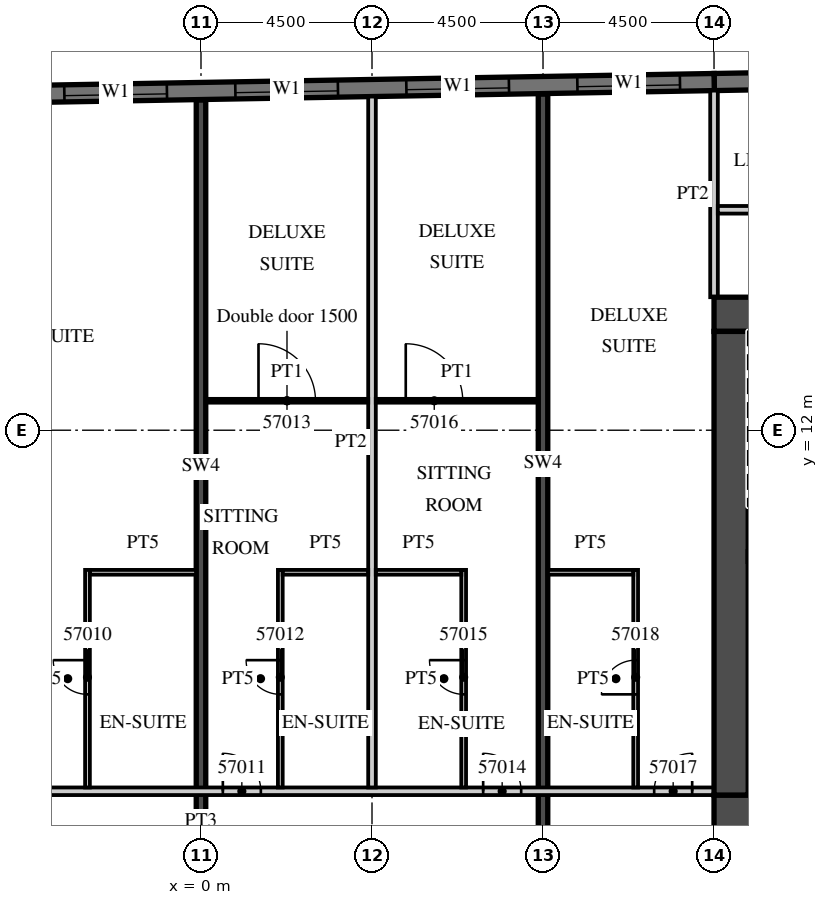
"""IFC4 building model, lengths in metres.
Left out: names, types, materials, properties, quantities, classifications, styles, units other than length and angle.
Written with IfcOpenShell. Run it as: python <this file> out.ifc"""

import sys

from ifc_helpers import new_model, si_unit, direction, frame, frame_2d, origin, place, context, subcontext, project, spatial, rectangle, extrude, element, fill, save


model = new_model("IFC4")
c1 = context("Model", 3, precision=1e-05, world=origin(), true_north=direction((0.0, 1.0)))
c2 = subcontext(c1, "Body", "Model", "MODEL_VIEW")
j1 = project(units=[si_unit("LENGTHUNIT", "METRE"), si_unit("PLANEANGLEUNIT", "RADIAN")], contexts=[c1])
p1 = place(None, origin())
s1 = spatial("IfcSite", under=j1, at=p1, CompositionType="ELEMENT")
p2 = place(p1, origin())
s2 = spatial("IfcBuilding", under=s1, at=p2, CompositionType="ELEMENT")
p3 = place(p2, frame((0.0, 0.0, 234.2)))
s3 = spatial("IfcBuildingStorey", under=s2, at=p3, CompositionType="ELEMENT", Elevation=234.2)
p4 = place(p3, frame((0.0, 1.4, 0.0), z_axis=(0.0, 0.0, 1.0), x_axis=(0.0, 1.0, 0.0)))
e1 = element("IfcWall", 1, at=p4, inside=s3, PredefinedType="SHEAR", context=c2, shape_type="SweptSolid", body=[
    extrude(rectangle(XDim=19.289, YDim=0.25, at=frame_2d((9.644, 0.0))), origin(), (0.0, 0.0, 1.0), 3.3),
])
p5 = place(p3, frame((9.0, 1.4, 0.0), z_axis=(0.0, 0.0, 1.0), x_axis=(0.0, 1.0, 0.0)))
e2 = element("IfcWall", 2, at=p5, inside=s3, PredefinedType="SHEAR", context=c2, shape_type="SweptSolid", body=[
    extrude(rectangle(XDim=19.446, YDim=0.25, at=frame_2d((9.723, 0.0))), origin(), (0.0, 0.0, 1.0), 3.3),
])
p6 = place(p3, frame((31.504, 21.476, 0.0), z_axis=(0.0, 0.0, 1.0), x_axis=(-0.999847677887, -0.017453395744, 0.0)))
e3 = element("IfcWall", 3, at=p6, inside=s3, PredefinedType="SOLIDWALL", context=c2, shape_type="SweptSolid", body=[
    extrude(rectangle(XDim=18.003, YDim=0.45, at=frame_2d((9.001, 0.0))), origin(), (0.0, 0.0, 1.0), 3.02),
])
p7 = place(p3, frame((13.504, 21.161, 0.0), z_axis=(0.0, 0.0, 1.0), x_axis=(-0.999847763257, -0.017448504532, 0.0)))
e4 = element("IfcWall", 4, at=p7, inside=s3, PredefinedType="SOLIDWALL", context=c2, shape_type="SweptSolid", body=[
    extrude(rectangle(XDim=46.859, YDim=0.45, at=frame_2d((23.43, 0.0))), origin(), (0.0, 0.0, 1.0), 3.02),
])
p8 = place(p7, frame((0.9, 0.0, 0.45)))
e5 = element("IfcOpeningElement", 5, at=p8, cuts=e4, PredefinedType="OPENING", context=c2, shape_type="SweptSolid", body=[
    extrude(rectangle(XDim=2.7, YDim=2.25, at=frame_2d((1.35, 1.125))), frame((0.0, 0.235, 0.0), z_axis=(0.0, -1.0, 0.0), x_axis=(1.0, 0.0, 0.0)), (0.0, 0.0, 1.0), 0.47),
])
p9 = place(p7, frame((5.401, 0.0, 0.45)))
e6 = element("IfcOpeningElement", 6, at=p9, cuts=e4, PredefinedType="OPENING", context=c2, shape_type="SweptSolid", body=[
    extrude(rectangle(XDim=2.7, YDim=2.25, at=frame_2d((1.35, 1.125))), frame((0.0, 0.235, 0.0), z_axis=(0.0, -1.0, 0.0), x_axis=(1.0, 0.0, 0.0)), (0.0, 0.0, 1.0), 0.47),
])
p10 = place(p7, frame((9.902, 0.0, 0.45)))
e7 = element("IfcOpeningElement", 7, at=p10, cuts=e4, PredefinedType="OPENING", context=c2, shape_type="SweptSolid", body=[
    extrude(rectangle(XDim=2.7, YDim=2.25, at=frame_2d((1.35, 1.125))), frame((0.0, 0.235, 0.0), z_axis=(0.0, -1.0, 0.0), x_axis=(1.0, 0.0, 0.0)), (0.0, 0.0, 1.0), 0.47),
])
p11 = place(p7, frame((14.402, 0.0, 0.45)))
e8 = element("IfcOpeningElement", 8, at=p11, cuts=e4, PredefinedType="OPENING", context=c2, shape_type="SweptSolid", body=[
    extrude(rectangle(XDim=2.7, YDim=2.25, at=frame_2d((1.35, 1.125))), frame((0.0, 0.235, 0.0), z_axis=(0.0, -1.0, 0.0), x_axis=(1.0, 0.0, 0.0)), (0.0, 0.0, 1.0), 0.47),
])
p12 = place(p7, frame((18.903, 0.0, 0.45)))
e9 = element("IfcOpeningElement", 9, at=p12, cuts=e4, PredefinedType="OPENING", context=c2, shape_type="SweptSolid", body=[
    extrude(rectangle(XDim=2.7, YDim=2.25, at=frame_2d((1.35, 1.125))), frame((0.0, 0.235, 0.0), z_axis=(0.0, -1.0, 0.0), x_axis=(1.0, 0.0, 0.0)), (0.0, 0.0, 1.0), 0.47),
])
p13 = place(p7, frame((23.404, 0.0, 0.45)))
e10 = element("IfcOpeningElement", 10, at=p13, cuts=e4, PredefinedType="OPENING", context=c2, shape_type="SweptSolid", body=[
    extrude(rectangle(XDim=2.7, YDim=2.25, at=frame_2d((1.35, 1.125))), frame((0.0, 0.235, 0.0), z_axis=(0.0, -1.0, 0.0), x_axis=(1.0, 0.0, 0.0)), (0.0, 0.0, 1.0), 0.47),
])
p14 = place(p7, frame((27.904, 0.0, 0.45)))
e11 = element("IfcOpeningElement", 11, at=p14, cuts=e4, PredefinedType="OPENING", context=c2, shape_type="SweptSolid", body=[
    extrude(rectangle(XDim=2.7, YDim=2.25, at=frame_2d((1.35, 1.125))), frame((0.0, 0.235, 0.0), z_axis=(0.0, -1.0, 0.0), x_axis=(1.0, 0.0, 0.0)), (0.0, 0.0, 1.0), 0.47),
])
p15 = place(p7, frame((32.405, 0.0, 0.45)))
e12 = element("IfcOpeningElement", 12, at=p15, cuts=e4, PredefinedType="OPENING", context=c2, shape_type="SweptSolid", body=[
    extrude(rectangle(XDim=2.7, YDim=2.25, at=frame_2d((1.35, 1.125))), frame((0.0, 0.235, 0.0), z_axis=(0.0, -1.0, 0.0), x_axis=(1.0, 0.0, 0.0)), (0.0, 0.0, 1.0), 0.47),
])
p16 = place(p7, frame((36.906, 0.0, 0.45)))
e13 = element("IfcOpeningElement", 13, at=p16, cuts=e4, PredefinedType="OPENING", context=c2, shape_type="SweptSolid", body=[
    extrude(rectangle(XDim=2.7, YDim=2.25, at=frame_2d((1.35, 1.125))), frame((0.0, 0.235, 0.0), z_axis=(0.0, -1.0, 0.0), x_axis=(1.0, 0.0, 0.0)), (0.0, 0.0, 1.0), 0.47),
])
p17 = place(p7, frame((41.406, 0.0, 0.45)))
e14 = element("IfcOpeningElement", 14, at=p17, cuts=e4, PredefinedType="OPENING", context=c2, shape_type="SweptSolid", body=[
    extrude(rectangle(XDim=2.7, YDim=2.25, at=frame_2d((1.35, 1.125))), frame((0.0, 0.235, 0.0), z_axis=(0.0, -1.0, 0.0), x_axis=(1.0, 0.0, 0.0)), (0.0, 0.0, 1.0), 0.47),
])
p18 = place(p3, frame((13.5, 15.5, 0.0), z_axis=(0.0, 0.0, 1.0), x_axis=(0.0, 1.0, 0.0)))
e15 = element("IfcWall", 15, at=p18, inside=s3, PredefinedType="PARTITIONING", context=c2, shape_type="SweptSolid", body=[
    extrude(rectangle(XDim=5.436, YDim=0.2, at=frame_2d((2.718, 0.0))), origin(), (0.0, 0.0, 1.0), 3.02),
])
p19 = place(p3, frame((-13.5, 2.5, 0.0), z_axis=(0.0, 0.0, 1.0), x_axis=(1.0, 0.0, 0.0)))
e16 = element("IfcWall", 16, at=p19, inside=s3, PredefinedType="PARTITIONING", context=c2, shape_type="SweptSolid", body=[
    extrude(rectangle(XDim=27.0, YDim=0.2, at=frame_2d((13.5, 0.0))), origin(), (0.0, 0.0, 1.0), 3.02),
])
p20 = place(p19, frame((2.925, 0.0, 0.0)))
e17 = element("IfcOpeningElement", 17, at=p20, cuts=e16, PredefinedType="OPENING", context=c2, shape_type="SweptSolid", body=[
    extrude(rectangle(XDim=1.0, YDim=2.1, at=frame_2d((0.5, 1.05))), frame((0.0, 0.11, 0.0), z_axis=(0.0, -1.0, 0.0), x_axis=(1.0, 0.0, 0.0)), (0.0, 0.0, 1.0), 0.22),
])
p21 = place(p19, frame((6.938, 0.0, 0.0)))
e18 = element("IfcOpeningElement", 18, at=p21, cuts=e16, PredefinedType="OPENING", context=c2, shape_type="SweptSolid", body=[
    extrude(rectangle(XDim=1.2, YDim=2.1, at=frame_2d((0.6, 1.05))), frame((0.0, 0.11, 0.0), z_axis=(0.0, -1.0, 0.0), x_axis=(1.0, 0.0, 0.0)), (0.0, 0.0, 1.0), 0.22),
])
p22 = place(p19, frame((14.075, 0.0, 0.0)))
e19 = element("IfcOpeningElement", 19, at=p22, cuts=e16, PredefinedType="OPENING", context=c2, shape_type="SweptSolid", body=[
    extrude(rectangle(XDim=1.0, YDim=2.1, at=frame_2d((0.5, 1.05))), frame((0.0, 0.11, 0.0), z_axis=(0.0, -1.0, 0.0), x_axis=(1.0, 0.0, 0.0)), (0.0, 0.0, 1.0), 0.22),
])
p23 = place(p19, frame((20.925, 0.0, 0.0)))
e20 = element("IfcOpeningElement", 20, at=p23, cuts=e16, PredefinedType="OPENING", context=c2, shape_type="SweptSolid", body=[
    extrude(rectangle(XDim=1.0, YDim=2.1, at=frame_2d((0.5, 1.05))), frame((0.0, 0.11, 0.0), z_axis=(0.0, -1.0, 0.0), x_axis=(1.0, 0.0, 0.0)), (0.0, 0.0, 1.0), 0.22),
])
p24 = place(p19, frame((25.425, 0.0, 0.0)))
e21 = element("IfcOpeningElement", 21, at=p24, cuts=e16, PredefinedType="OPENING", context=c2, shape_type="SweptSolid", body=[
    extrude(rectangle(XDim=1.0, YDim=2.1, at=frame_2d((0.5, 1.05))), frame((0.0, 0.11, 0.0), z_axis=(0.0, -1.0, 0.0), x_axis=(1.0, 0.0, 0.0)), (0.0, 0.0, 1.0), 0.22),
])
p25 = place(p3, frame((-2.987, 2.6, 0.0), z_axis=(0.0, 0.0, 1.0), x_axis=(0.0, 1.0, 0.0)))
e22 = element("IfcWall", 22, at=p25, inside=s3, PredefinedType="PARTITIONING", context=c2, shape_type="SweptSolid", body=[
    extrude(rectangle(XDim=5.725, YDim=0.125, at=frame_2d((2.862, 0.0))), origin(), (0.0, 0.0, 1.0), 3.02),
])
p26 = place(p25, frame((2.45, 0.0, 0.0)))
e23 = element("IfcOpeningElement", 23, at=p26, cuts=e22, PredefinedType="OPENING", context=c2, shape_type="SweptSolid", body=[
    extrude(rectangle(XDim=0.9, YDim=2.1, at=frame_2d((0.45, 1.05))), frame((0.0, 0.073, 0.0), z_axis=(0.0, -1.0, 0.0), x_axis=(1.0, 0.0, 0.0)), (0.0, 0.0, 1.0), 0.145),
])
p27 = place(p3, frame((-2.925, 8.262, 0.0), z_axis=(0.0, 0.0, 1.0), x_axis=(1.0, 0.0, 0.0)))
e24 = element("IfcWall", 24, at=p27, inside=s3, PredefinedType="PARTITIONING", context=c2, shape_type="SweptSolid", body=[
    extrude(rectangle(XDim=2.8, YDim=0.125, at=frame_2d((1.4, 0.0))), origin(), (0.0, 0.0, 1.0), 3.02),
])
p28 = place(p3, frame((4.5, 2.6, 0.0), z_axis=(0.0, 0.0, 1.0), x_axis=(0.0, 1.0, 0.0)))
e25 = element("IfcWall", 25, at=p28, inside=s3, PredefinedType="PARTITIONING", context=c2, shape_type="SweptSolid", body=[
    extrude(rectangle(XDim=18.179, YDim=0.2, at=frame_2d((9.089, 0.0))), origin(), (0.0, 0.0, 1.0), 3.02),
])
p29 = place(p3, frame((2.087, 2.6, 0.0), z_axis=(0.0, 0.0, 1.0), x_axis=(0.0, 1.0, 0.0)))
e26 = element("IfcWall", 26, at=p29, inside=s3, PredefinedType="PARTITIONING", context=c2, shape_type="SweptSolid", body=[
    extrude(rectangle(XDim=5.725, YDim=0.125, at=frame_2d((2.862, 0.0))), origin(), (0.0, 0.0, 1.0), 3.02),
])
p30 = place(p29, frame((2.45, 0.0, 0.0)))
e27 = element("IfcOpeningElement", 27, at=p30, cuts=e26, PredefinedType="OPENING", context=c2, shape_type="SweptSolid", body=[
    extrude(rectangle(XDim=0.9, YDim=2.1, at=frame_2d((0.45, 1.05))), frame((0.0, 0.073, 0.0), z_axis=(0.0, -1.0, 0.0), x_axis=(1.0, 0.0, 0.0)), (0.0, 0.0, 1.0), 0.145),
])
p31 = place(p3, frame((2.15, 8.262, 0.0), z_axis=(0.0, 0.0, 1.0), x_axis=(1.0, 0.0, 0.0)))
e28 = element("IfcWall", 28, at=p31, inside=s3, PredefinedType="PARTITIONING", context=c2, shape_type="SweptSolid", body=[
    extrude(rectangle(XDim=2.25, YDim=0.125, at=frame_2d((1.125, 0.0))), origin(), (0.0, 0.0, 1.0), 3.02),
])
p32 = place(p3, frame((0.125, 12.775, 0.0), z_axis=(0.0, 0.0, 1.0), x_axis=(1.0, 0.0, 0.0)))
e29 = element("IfcWall", 29, at=p32, inside=s3, PredefinedType="PARTITIONING", context=c2, shape_type="SweptSolid", body=[
    extrude(rectangle(XDim=4.275, YDim=0.1, at=frame_2d((2.137, 0.0))), origin(), (0.0, 0.0, 1.0), 3.02),
])
p33 = place(p32, frame((1.388, 0.0, 0.0)))
e30 = element("IfcOpeningElement", 30, at=p33, cuts=e29, PredefinedType="OPENING", context=c2, shape_type="SweptSolid", body=[
    extrude(rectangle(XDim=1.5, YDim=2.1, at=frame_2d((0.75, 1.05))), frame((0.0, 0.06, 0.0), z_axis=(0.0, -1.0, 0.0), x_axis=(1.0, 0.0, 0.0)), (0.0, 0.0, 1.0), 0.12),
])
p34 = place(p3, frame((6.912, 2.6, 0.0), z_axis=(0.0, 0.0, 1.0), x_axis=(0.0, 1.0, 0.0)))
e31 = element("IfcWall", 31, at=p34, inside=s3, PredefinedType="PARTITIONING", context=c2, shape_type="SweptSolid", body=[
    extrude(rectangle(XDim=5.725, YDim=0.125, at=frame_2d((2.862, 0.0))), origin(), (0.0, 0.0, 1.0), 3.02),
])
p35 = place(p34, frame((2.45, 0.0, 0.0)))
e32 = element("IfcOpeningElement", 32, at=p35, cuts=e31, PredefinedType="OPENING", context=c2, shape_type="SweptSolid", body=[
    extrude(rectangle(XDim=0.9, YDim=2.1, at=frame_2d((0.45, 1.05))), frame((0.0, 0.073, 0.0), z_axis=(0.0, -1.0, 0.0), x_axis=(1.0, 0.0, 0.0)), (0.0, 0.0, 1.0), 0.145),
])
p36 = place(p3, frame((4.6, 8.262, 0.0), z_axis=(0.0, 0.0, 1.0), x_axis=(1.0, 0.0, 0.0)))
e33 = element("IfcWall", 33, at=p36, inside=s3, PredefinedType="PARTITIONING", context=c2, shape_type="SweptSolid", body=[
    extrude(rectangle(XDim=2.25, YDim=0.125, at=frame_2d((1.125, 0.0))), origin(), (0.0, 0.0, 1.0), 3.02),
])
p37 = place(p3, frame((4.6, 12.775, 0.0), z_axis=(0.0, 0.0, 1.0), x_axis=(1.0, 0.0, 0.0)))
e34 = element("IfcWall", 34, at=p37, inside=s3, PredefinedType="PARTITIONING", context=c2, shape_type="SweptSolid", body=[
    extrude(rectangle(XDim=4.275, YDim=0.1, at=frame_2d((2.137, 0.0))), origin(), (0.0, 0.0, 1.0), 3.02),
])
p38 = place(p37, frame((0.788, 0.0, 0.0)))
e35 = element("IfcOpeningElement", 35, at=p38, cuts=e34, PredefinedType="OPENING", context=c2, shape_type="SweptSolid", body=[
    extrude(rectangle(XDim=1.5, YDim=2.1, at=frame_2d((0.75, 1.05))), frame((0.0, 0.06, 0.0), z_axis=(0.0, -1.0, 0.0), x_axis=(1.0, 0.0, 0.0)), (0.0, 0.0, 1.0), 0.12),
])
p39 = place(p3, frame((11.438, 2.6, 0.0), z_axis=(0.0, 0.0, 1.0), x_axis=(0.0, 1.0, 0.0)))
e36 = element("IfcWall", 36, at=p39, inside=s3, PredefinedType="PARTITIONING", context=c2, shape_type="SweptSolid", body=[
    extrude(rectangle(XDim=5.725, YDim=0.125, at=frame_2d((2.862, 0.0))), origin(), (0.0, 0.0, 1.0), 3.02),
])
p40 = place(p39, frame((2.45, 0.0, 0.0)))
e37 = element("IfcOpeningElement", 37, at=p40, cuts=e36, PredefinedType="OPENING", context=c2, shape_type="SweptSolid", body=[
    extrude(rectangle(XDim=0.9, YDim=2.1, at=frame_2d((0.45, 1.05))), frame((0.0, 0.073, 0.0), z_axis=(0.0, -1.0, 0.0), x_axis=(1.0, 0.0, 0.0)), (0.0, 0.0, 1.0), 0.145),
])
p41 = place(p3, frame((9.125, 8.262, 0.0), z_axis=(0.0, 0.0, 1.0), x_axis=(1.0, 0.0, 0.0)))
e38 = element("IfcWall", 38, at=p41, inside=s3, PredefinedType="PARTITIONING", context=c2, shape_type="SweptSolid", body=[
    extrude(rectangle(XDim=2.25, YDim=0.125, at=frame_2d((1.125, 0.0))), origin(), (0.0, 0.0, 1.0), 3.02),
])
p42 = place(p3, frame((13.5, 1.95, 0.0), z_axis=(0.0, 0.0, 1.0), x_axis=(1.0, 0.0, 0.0)))
e39 = element("IfcWall", 39, at=p42, inside=s3, PredefinedType="SHEAR", context=c2, shape_type="SweptSolid", body=[
    extrude(rectangle(XDim=18.0, YDim=0.9, at=frame_2d((9.0, 0.0))), origin(), (0.0, 0.0, 1.0), 3.02),
])
p43 = place(p42, frame((1.475, 0.0, 0.0)))
e40 = element("IfcOpeningElement", 40, at=p43, cuts=e39, PredefinedType="OPENING", context=c2, shape_type="SweptSolid", body=[
    extrude(rectangle(XDim=1.8, YDim=2.1, at=frame_2d((0.9, 1.05))), frame((0.0, 0.46, 0.0), z_axis=(0.0, -1.0, 0.0), x_axis=(1.0, 0.0, 0.0)), (0.0, 0.0, 1.0), 0.92),
])
p44 = place(p3, frame((13.5, 15.05, 0.0), z_axis=(0.0, 0.0, 1.0), x_axis=(1.0, 0.0, 0.0)))
e41 = element("IfcWall", 41, at=p44, inside=s3, PredefinedType="SHEAR", context=c2, shape_type="SweptSolid", body=[
    extrude(rectangle(XDim=6.8, YDim=0.9, at=frame_2d((3.4, 0.0))), origin(), (0.0, 0.0, 1.0), 3.02),
])
p45 = place(p44, frame((4.725, 0.0, 0.0)))
e42 = element("IfcOpeningElement", 42, at=p45, cuts=e41, PredefinedType="OPENING", context=c2, shape_type="SweptSolid", body=[
    extrude(rectangle(XDim=1.2, YDim=2.1, at=frame_2d((0.6, 1.05))), frame((0.0, 0.46, 0.0), z_axis=(0.0, -1.0, 0.0), x_axis=(1.0, 0.0, 0.0)), (0.0, 0.0, 1.0), 0.92),
])
p46 = place(p3, frame((13.95, 2.4, 0.0), z_axis=(0.0, 0.0, 1.0), x_axis=(0.0, 1.0, 0.0)))
e43 = element("IfcWall", 43, at=p46, inside=s3, PredefinedType="SHEAR", context=c2, shape_type="SweptSolid", body=[
    extrude(rectangle(XDim=12.2, YDim=0.9, at=frame_2d((6.1, 0.0))), origin(), (0.0, 0.0, 1.0), 3.02),
])
p47 = place(p3, frame((13.6, 17.8, 0.0), z_axis=(0.0, 0.0, 1.0), x_axis=(1.0, 0.0, 0.0)))
e44 = element("IfcWall", 44, at=p47, inside=s3, PredefinedType="PARTITIONING", context=c2, shape_type="SweptSolid", body=[
    extrude(rectangle(XDim=28.657, YDim=0.2, at=frame_2d((14.329, 0.0))), origin(), (0.0, 0.0, 1.0), 3.02),
])
p48 = place(p47, frame((16.613, 0.0, 0.0)))
e45 = element("IfcOpeningElement", 45, at=p48, cuts=e44, PredefinedType="OPENING", context=c2, shape_type="SweptSolid", body=[
    extrude(rectangle(XDim=0.9, YDim=2.1, at=frame_2d((0.45, 1.05))), frame((0.0, 0.11, 0.0), z_axis=(0.0, -1.0, 0.0), x_axis=(1.0, 0.0, 0.0)), (0.0, 0.0, 1.0), 0.22),
])
p49 = place(p47, frame((8.312, 0.0, 0.0)))
e46 = element("IfcOpeningElement", 46, at=p49, cuts=e44, PredefinedType="OPENING", context=c2, shape_type="SweptSolid", body=[
    extrude(rectangle(XDim=0.9, YDim=2.1, at=frame_2d((0.45, 1.05))), frame((0.0, 0.11, 0.0), z_axis=(0.0, -1.0, 0.0), x_axis=(1.0, 0.0, 0.0)), (0.0, 0.0, 1.0), 0.22),
])
p50 = place(p8, origin())
e47 = element("IfcWindow", 47, at=p50, inside=s3, PartitioningType="SINGLE_PANEL", PredefinedType="WINDOW", context=c2, shape_type="SweptSolid", body=[
    extrude(rectangle(XDim=2.7, YDim=2.25, at=frame_2d((1.35, 1.125))), frame((0.0, 0.09, 0.0), z_axis=(0.0, -1.0, 0.0), x_axis=(1.0, 0.0, 0.0)), (0.0, 0.0, 1.0), 0.06),
])
fill(e5, e47)
p51 = place(p9, origin())
e48 = element("IfcWindow", 48, at=p51, inside=s3, PartitioningType="SINGLE_PANEL", PredefinedType="WINDOW", context=c2, shape_type="SweptSolid", body=[
    extrude(rectangle(XDim=2.7, YDim=2.25, at=frame_2d((1.35, 1.125))), frame((0.0, 0.09, 0.0), z_axis=(0.0, -1.0, 0.0), x_axis=(1.0, 0.0, 0.0)), (0.0, 0.0, 1.0), 0.06),
])
fill(e6, e48)
p52 = place(p10, origin())
e49 = element("IfcWindow", 49, at=p52, inside=s3, PartitioningType="SINGLE_PANEL", PredefinedType="WINDOW", context=c2, shape_type="SweptSolid", body=[
    extrude(rectangle(XDim=2.7, YDim=2.25, at=frame_2d((1.35, 1.125))), frame((0.0, 0.09, 0.0), z_axis=(0.0, -1.0, 0.0), x_axis=(1.0, 0.0, 0.0)), (0.0, 0.0, 1.0), 0.06),
])
fill(e7, e49)
p53 = place(p11, origin())
e50 = element("IfcWindow", 50, at=p53, inside=s3, PartitioningType="SINGLE_PANEL", PredefinedType="WINDOW", context=c2, shape_type="SweptSolid", body=[
    extrude(rectangle(XDim=2.7, YDim=2.25, at=frame_2d((1.35, 1.125))), frame((0.0, 0.09, 0.0), z_axis=(0.0, -1.0, 0.0), x_axis=(1.0, 0.0, 0.0)), (0.0, 0.0, 1.0), 0.06),
])
fill(e8, e50)
p54 = place(p26, origin())
e51 = element("IfcDoor", 51, at=p54, inside=s3, OperationType="SINGLE_SWING_RIGHT", PredefinedType="DOOR", context=c2, shape_type="SweptSolid", body=[
    extrude(rectangle(XDim=0.9, YDim=2.1, at=frame_2d((0.45, 1.05))), frame((0.0, 0.025, 0.0), z_axis=(0.0, -1.0, 0.0), x_axis=(1.0, 0.0, 0.0)), (0.0, 0.0, 1.0), 0.05),
])
fill(e23, e51)
p55 = place(p22, origin())
e52 = element("IfcDoor", 52, at=p55, inside=s3, OperationType="SINGLE_SWING_LEFT", PredefinedType="DOOR", context=c2, shape_type="SweptSolid", body=[
    extrude(rectangle(XDim=1.0, YDim=2.1, at=frame_2d((0.5, 1.05))), frame((0.0, 0.025, 0.0), z_axis=(0.0, -1.0, 0.0), x_axis=(1.0, 0.0, 0.0)), (0.0, 0.0, 1.0), 0.05),
])
fill(e19, e52)
p56 = place(p30, origin())
e53 = element("IfcDoor", 53, at=p56, inside=s3, OperationType="SINGLE_SWING_RIGHT", PredefinedType="DOOR", context=c2, shape_type="SweptSolid", body=[
    extrude(rectangle(XDim=0.9, YDim=2.1, at=frame_2d((0.45, 1.05))), frame((0.0, 0.025, 0.0), z_axis=(0.0, -1.0, 0.0), x_axis=(1.0, 0.0, 0.0)), (0.0, 0.0, 1.0), 0.05),
])
fill(e27, e53)
p57 = place(p33, origin())
e54 = element("IfcDoor", 54, at=p57, inside=s3, OperationType="SINGLE_SWING_LEFT", PredefinedType="DOOR", context=c2, shape_type="SweptSolid", body=[
    extrude(rectangle(XDim=1.5, YDim=2.1, at=frame_2d((0.75, 1.05))), frame((0.0, 0.025, 0.0), z_axis=(0.0, -1.0, 0.0), x_axis=(1.0, 0.0, 0.0)), (0.0, 0.0, 1.0), 0.05),
])
fill(e30, e54)
p58 = place(p23, origin())
e55 = element("IfcDoor", 55, at=p58, inside=s3, OperationType="SINGLE_SWING_LEFT", PredefinedType="DOOR", context=c2, shape_type="SweptSolid", body=[
    extrude(rectangle(XDim=1.0, YDim=2.1, at=frame_2d((0.5, 1.05))), frame((0.0, 0.025, 0.0), z_axis=(0.0, -1.0, 0.0), x_axis=(1.0, 0.0, 0.0)), (0.0, 0.0, 1.0), 0.05),
])
fill(e20, e55)
p59 = place(p35, origin())
e56 = element("IfcDoor", 56, at=p59, inside=s3, OperationType="SINGLE_SWING_RIGHT", PredefinedType="DOOR", context=c2, shape_type="SweptSolid", body=[
    extrude(rectangle(XDim=0.9, YDim=2.1, at=frame_2d((0.45, 1.05))), frame((0.0, 0.025, 0.0), z_axis=(0.0, -1.0, 0.0), x_axis=(1.0, 0.0, 0.0)), (0.0, 0.0, 1.0), 0.05),
])
fill(e32, e56)
p60 = place(p38, origin())
e57 = element("IfcDoor", 57, at=p60, inside=s3, OperationType="SINGLE_SWING_LEFT", PredefinedType="DOOR", context=c2, shape_type="SweptSolid", body=[
    extrude(rectangle(XDim=1.5, YDim=2.1, at=frame_2d((0.75, 1.05))), frame((0.0, 0.025, 0.0), z_axis=(0.0, -1.0, 0.0), x_axis=(1.0, 0.0, 0.0)), (0.0, 0.0, 1.0), 0.05),
])
fill(e35, e57)
p61 = place(p24, origin())
e58 = element("IfcDoor", 58, at=p61, inside=s3, OperationType="SINGLE_SWING_RIGHT", PredefinedType="DOOR", context=c2, shape_type="SweptSolid", body=[
    extrude(rectangle(XDim=1.0, YDim=2.1, at=frame_2d((0.5, 1.05))), frame((0.0, 0.025, 0.0), z_axis=(0.0, -1.0, 0.0), x_axis=(1.0, 0.0, 0.0)), (0.0, 0.0, 1.0), 0.05),
])
fill(e21, e58)
p62 = place(p40, origin())
e59 = element("IfcDoor", 59, at=p62, inside=s3, OperationType="SINGLE_SWING_LEFT", PredefinedType="DOOR", context=c2, shape_type="SweptSolid", body=[
    extrude(rectangle(XDim=0.9, YDim=2.1, at=frame_2d((0.45, 1.05))), frame((0.0, 0.025, 0.0), z_axis=(0.0, -1.0, 0.0), x_axis=(1.0, 0.0, 0.0)), (0.0, 0.0, 1.0), 0.05),
])
fill(e37, e59)
save(model, sys.argv[1])
